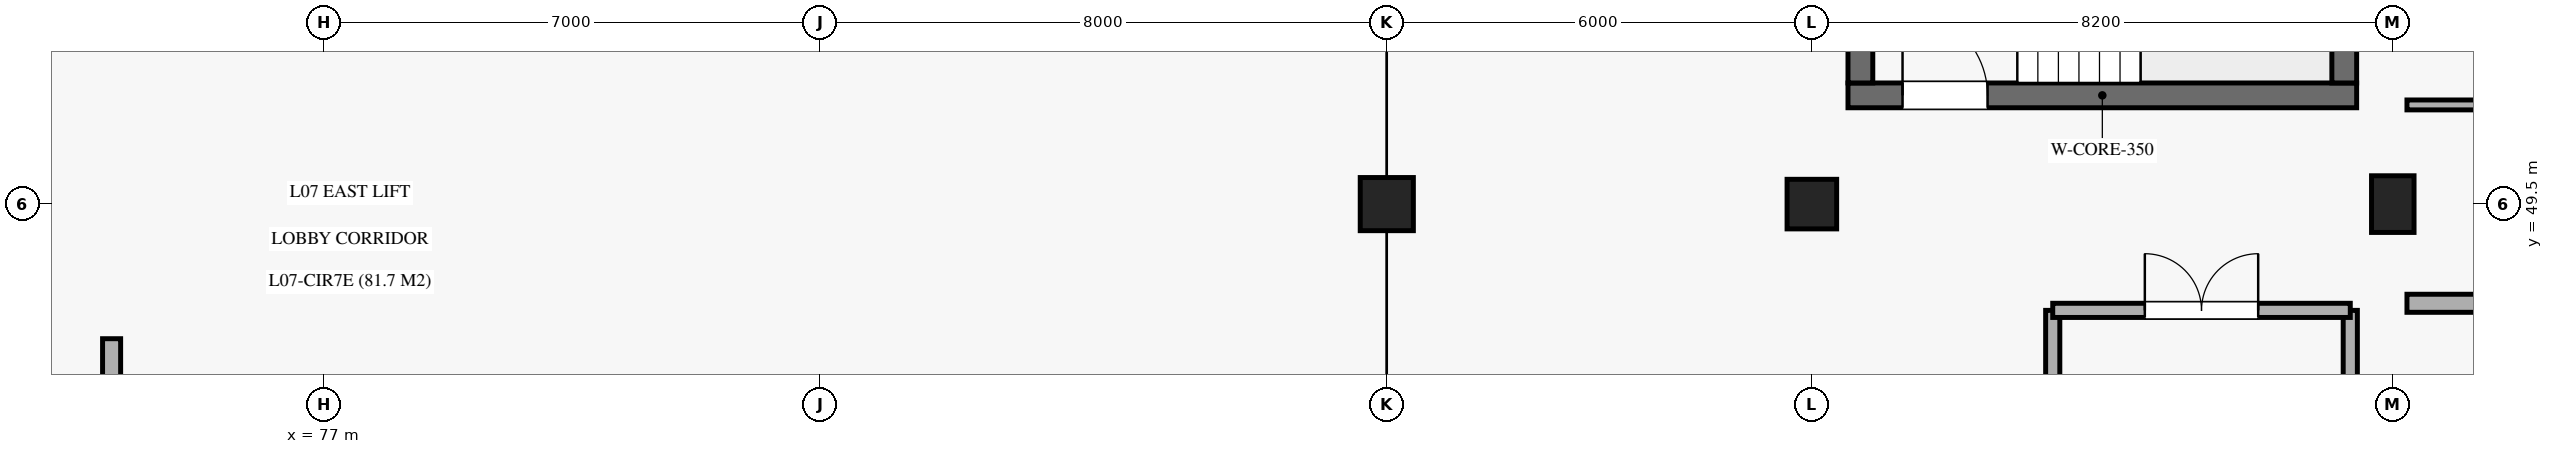
"""IFC4 building model, lengths in metres.
Left out: names, types, materials, properties, quantities, classifications, styles, units other than length and angle.
Written with IfcOpenShell. Run it as: python <this file> out.ifc"""

import sys

from ifc_helpers import new_model, si_unit, direction, frame, frame_2d, origin, origin_2d, place, context, subcontext, project, spatial, rectangle, extrude, element, fill, save


model = new_model("IFC4")
c1 = context("Model", 3, precision=1e-05, world=origin(), true_north=direction((0.0, 1.0)))
c2 = subcontext(c1, "Body", "Model", "MODEL_VIEW")
j1 = project(units=[si_unit("LENGTHUNIT", "METRE"), si_unit("PLANEANGLEUNIT", "RADIAN")], contexts=[c1])
p1 = place(None, origin())
s1 = spatial("IfcSite", under=j1, at=p1, CompositionType="ELEMENT")
p2 = place(p1, origin())
s2 = spatial("IfcBuilding", under=s1, at=p2, CompositionType="ELEMENT")
p3 = place(p2, frame((0.0, 0.0, 37.74)))
s3 = spatial("IfcBuildingStorey", under=s2, at=p3, CompositionType="ELEMENT", Elevation=37.74)
p4 = place(p3, frame((92.0, 49.5, 0.0), z_axis=(0.0, 0.0, 1.0), x_axis=(1.0, 0.0, 0.0)))
e1 = element("IfcColumn", 1, at=p4, inside=s3, PredefinedType="COLUMN", context=c2, shape_type="SweptSolid", body=[
    extrude(rectangle(XDim=0.75, YDim=0.75, at=origin_2d()), origin(), (0.0, 0.0, 1.0), 4.59),
])
p5 = place(p3, frame((98.0, 49.5, 0.0), z_axis=(0.0, 0.0, 1.0), x_axis=(1.0, 0.0, 0.0)))
e2 = element("IfcColumn", 2, at=p5, inside=s3, PredefinedType="COLUMN", context=c2, shape_type="SweptSolid", body=[
    extrude(rectangle(XDim=0.7, YDim=0.7, at=origin_2d()), origin(), (0.0, 0.0, 1.0), 4.59),
])
p6 = place(p3, frame((106.2, 49.5, 0.0), z_axis=(0.0, 0.0, 1.0), x_axis=(1.0, 0.0, 0.0)))
e3 = element("IfcColumn", 3, at=p6, inside=s3, PredefinedType="COLUMN", context=c2, shape_type="SweptSolid", body=[
    extrude(rectangle(XDim=0.6, YDim=0.8, at=origin_2d()), origin(), (0.0, 0.0, 1.0), 4.59),
])
p7 = place(p3, frame((98.51, 51.035, 0.0), z_axis=(0.0, 0.0, 1.0), x_axis=(1.0, 0.0, 0.0)))
e4 = element("IfcWall", 4, at=p7, inside=s3, PredefinedType="SHEAR", context=c2, shape_type="SweptSolid", body=[
    extrude(rectangle(XDim=7.18, YDim=0.35, at=frame_2d((3.59, 0.0))), origin(), (0.0, 0.0, 1.0), 4.31),
])
p8 = place(p7, frame((0.77, 0.0, 0.0)))
e5 = element("IfcOpeningElement", 5, at=p8, cuts=e4, PredefinedType="OPENING", context=c2, shape_type="SweptSolid", body=[
    extrude(rectangle(XDim=1.2, YDim=2.2, at=frame_2d((0.6, 1.1))), frame((0.0, 0.185, 0.0), z_axis=(0.0, -1.0, 0.0), x_axis=(1.0, 0.0, 0.0)), (0.0, 0.0, 1.0), 0.37),
])
for number, where, z_axis, x_axis in (
    (6, (98.685, 51.21, 0.0), (0.0, 0.0, 1.0), (0.0, 1.0, 0.0)),
    (7, (105.515, 51.21, 0.0), (0.0, 0.0, 1.0), (0.0, 1.0, 0.0)),
):
    element("IfcWall", number, at=place(p3, frame(where, z_axis=z_axis, x_axis=x_axis)), inside=s3, PredefinedType="SHEAR", context=c2, shape_type="SweptSolid", body=[
        extrude(rectangle(XDim=6.48, YDim=0.35, at=frame_2d((3.24, 0.0))), origin(), (0.0, 0.0, 1.0), 4.31),
    ])
p9 = place(p3, frame((101.4, 45.6, 0.0), z_axis=(0.0, 0.0, 1.0), x_axis=(0.0, 1.0, 0.0)))
e8 = element("IfcWall", 8, at=p9, inside=s3, PredefinedType="SOLIDWALL", context=c2, shape_type="SweptSolid", body=[
    extrude(rectangle(XDim=2.4, YDim=0.2, at=frame_2d((1.2, 0.0))), origin(), (0.0, 0.0, 1.0), 3.43),
])
p10 = place(p3, frame((105.6, 40.3, 0.0), z_axis=(0.0, 0.0, 1.0), x_axis=(0.0, 1.0, 0.0)))
e9 = element("IfcWall", 9, at=p10, inside=s3, PredefinedType="SOLIDWALL", context=c2, shape_type="SweptSolid", body=[
    extrude(rectangle(XDim=7.7, YDim=0.2, at=frame_2d((3.85, 0.0))), origin(), (0.0, 0.0, 1.0), 3.43),
])
p11 = place(p3, frame((101.4, 48.0, 0.0), z_axis=(0.0, 0.0, 1.0), x_axis=(1.0, 0.0, 0.0)))
e10 = element("IfcWall", 10, at=p11, inside=s3, PredefinedType="SOLIDWALL", context=c2, shape_type="SweptSolid", body=[
    extrude(rectangle(XDim=4.2, YDim=0.2, at=frame_2d((2.1, 0.0))), origin(), (0.0, 0.0, 1.0), 3.43),
])
p12 = place(p11, frame((1.3, 0.0, 0.0)))
e11 = element("IfcOpeningElement", 11, at=p12, cuts=e10, PredefinedType="OPENING", context=c2, shape_type="SweptSolid", body=[
    extrude(rectangle(XDim=1.6, YDim=2.2, at=frame_2d((0.8, 1.1))), frame((0.0, 0.11, 0.0), z_axis=(0.0, -1.0, 0.0), x_axis=(1.0, 0.0, 0.0)), (0.0, 0.0, 1.0), 0.22),
])
p13 = place(p3, frame((74.0, 30.2, 0.0), z_axis=(0.0, 0.0, 1.0), x_axis=(0.0, 1.0, 0.0)))
e12 = element("IfcWall", 12, at=p13, inside=s3, PredefinedType="SOLIDWALL", context=c2, shape_type="SweptSolid", body=[
    extrude(rectangle(XDim=17.4, YDim=0.255, at=frame_2d((8.7, 0.0))), origin(), (0.0, 0.0, 1.0), 3.43),
])
p14 = place(p13, frame((6.5, 0.0, 0.0)))
e13 = element("IfcOpeningElement", 13, at=p14, cuts=e12, PredefinedType="OPENING", context=c2, shape_type="SweptSolid", body=[
    extrude(rectangle(XDim=1.6, YDim=2.3, at=frame_2d((0.8, 1.15))), frame((0.0, 0.137, 0.0), z_axis=(0.0, -1.0, 0.0), x_axis=(1.0, 0.0, 0.0)), (0.0, 0.0, 1.0), 0.275),
])
p15 = place(p3, frame((106.4, 50.9, 0.0), z_axis=(0.0, 0.0, 1.0), x_axis=(1.0, 0.0, 0.0)))
e14 = element("IfcWall", 14, at=p15, inside=s3, PredefinedType="PARTITIONING", context=c2, shape_type="SweptSolid", body=[
    extrude(rectangle(XDim=7.2, YDim=0.14, at=frame_2d((3.6, 0.0))), origin(), (0.0, 0.0, 1.0), 3.43),
])
p16 = place(p15, frame((2.2, 0.0, 0.0)))
e15 = element("IfcOpeningElement", 15, at=p16, cuts=e14, PredefinedType="OPENING", context=c2, shape_type="SweptSolid", body=[
    extrude(rectangle(XDim=1.5, YDim=2.2, at=frame_2d((0.75, 1.1))), frame((0.0, 0.08, 0.0), z_axis=(0.0, -1.0, 0.0), x_axis=(1.0, 0.0, 0.0)), (0.0, 0.0, 1.0), 0.16),
])
p17 = place(p3, frame((106.4, 48.1, 0.0), z_axis=(0.0, 0.0, 1.0), x_axis=(1.0, 0.0, 0.0)))
e16 = element("IfcWall", 16, at=p17, inside=s3, PredefinedType="SOLIDWALL", context=c2, shape_type="SweptSolid", body=[
    extrude(rectangle(XDim=7.2, YDim=0.255, at=frame_2d((3.6, 0.0))), origin(), (0.0, 0.0, 1.0), 3.43),
])
p18 = place(p17, frame((2.2, 0.0, 0.0)))
e17 = element("IfcOpeningElement", 17, at=p18, cuts=e16, PredefinedType="OPENING", context=c2, shape_type="SweptSolid", body=[
    extrude(rectangle(XDim=1.4, YDim=2.25, at=frame_2d((0.7, 1.125))), frame((0.0, 0.137, 0.0), z_axis=(0.0, -1.0, 0.0), x_axis=(1.0, 0.0, 0.0)), (0.0, 0.0, 1.0), 0.275),
])
p19 = place(p8, origin())
e18 = element("IfcDoor", 18, at=p19, inside=s3, OperationType="SINGLE_SWING_LEFT", PredefinedType="DOOR", context=c2, shape_type="SweptSolid", body=[
    extrude(rectangle(XDim=1.2, YDim=2.2, at=frame_2d((0.6, 1.1))), frame((0.0, 0.025, 0.0), z_axis=(0.0, -1.0, 0.0), x_axis=(1.0, 0.0, 0.0)), (0.0, 0.0, 1.0), 0.05),
])
fill(e5, e18)
p20 = place(p12, origin())
e19 = element("IfcDoor", 19, at=p20, inside=s3, OperationType="DOUBLE_DOOR_SINGLE_SWING", PredefinedType="DOOR", context=c2, shape_type="SweptSolid", body=[
    extrude(rectangle(XDim=1.6, YDim=2.2, at=frame_2d((0.8, 1.1))), frame((0.0, 0.025, 0.0), z_axis=(0.0, -1.0, 0.0), x_axis=(1.0, 0.0, 0.0)), (0.0, 0.0, 1.0), 0.05),
])
fill(e11, e19)
save(model, sys.argv[1])
